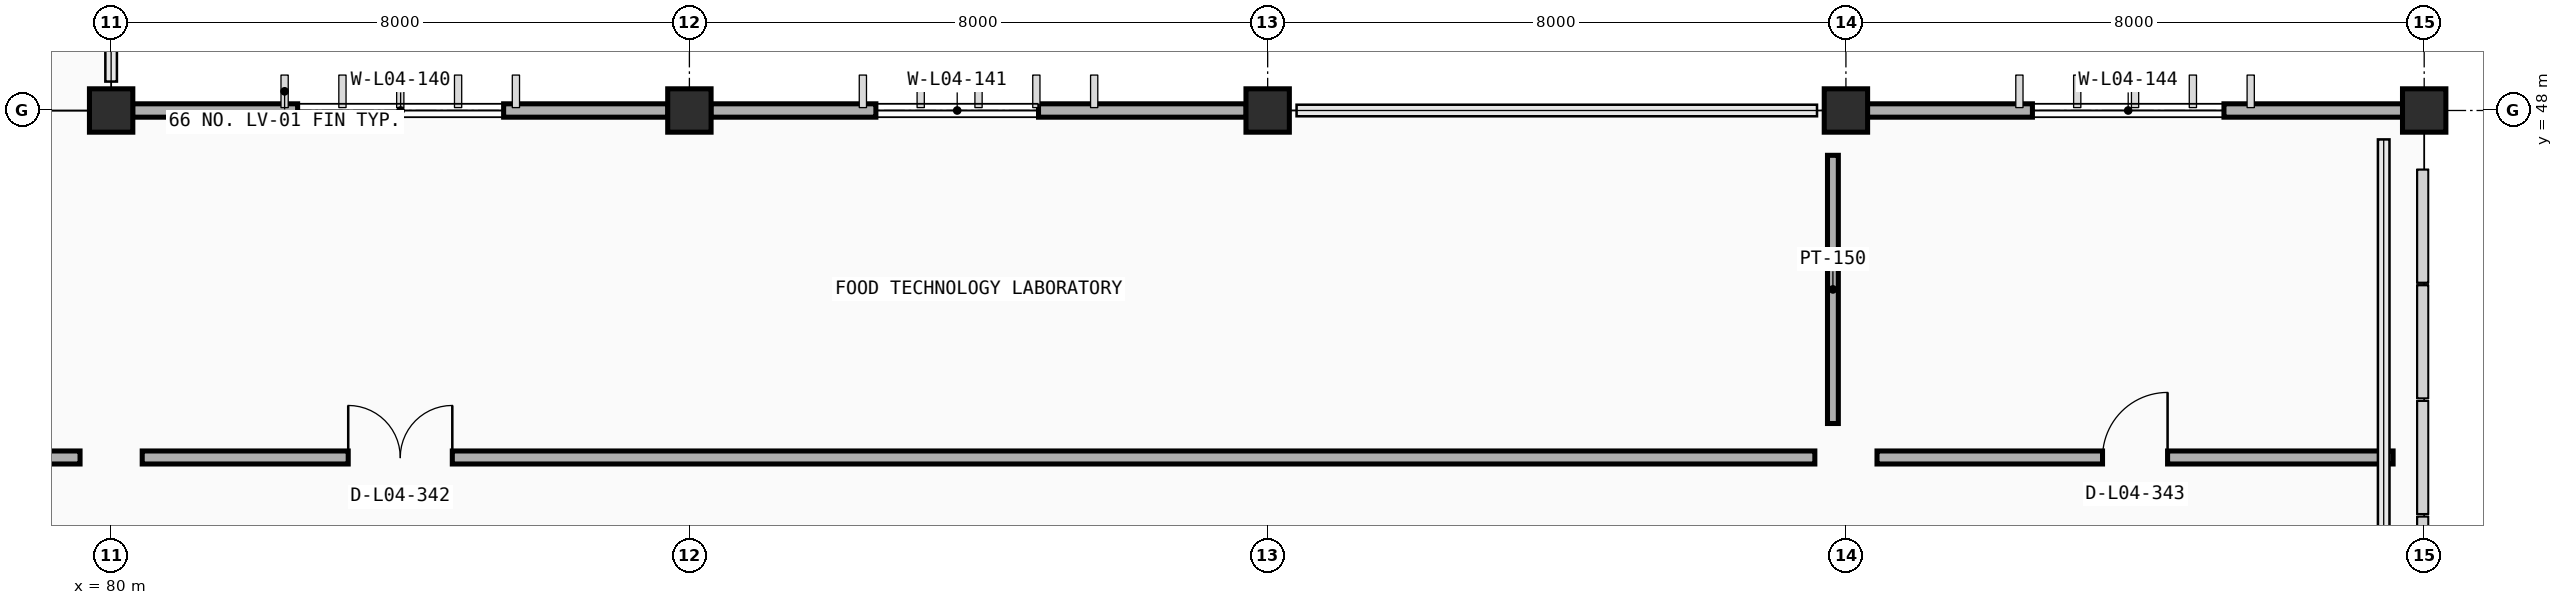
"""IFC4 building model, lengths in metres.
Left out: names, types, materials, properties, quantities, classifications, styles, units other than length and angle.
Written with IfcOpenShell. Run it as: python <this file> out.ifc"""

import sys

from ifc_helpers import new_model, si_unit, direction, frame, frame_2d, origin, origin_2d, place, context, subcontext, project, spatial, rectangle, extrude, element, fill, save


model = new_model("IFC4")
c1 = context("Model", 3, precision=1e-05, world=origin(), true_north=direction((0.0, 1.0)))
c2 = subcontext(c1, "Body", "Model", "MODEL_VIEW")
j1 = project(units=[si_unit("LENGTHUNIT", "METRE"), si_unit("PLANEANGLEUNIT", "RADIAN")], contexts=[c1])
p1 = place(None, origin())
s1 = spatial("IfcSite", under=j1, at=p1, CompositionType="ELEMENT")
p2 = place(p1, origin())
s2 = spatial("IfcBuilding", under=s1, at=p2, CompositionType="ELEMENT")
p3 = place(p2, frame((0.0, 0.0, 13.8)))
s3 = spatial("IfcBuildingStorey", under=s2, at=p3, CompositionType="ELEMENT", Elevation=13.8)
for number, where, z_axis, x_axis in (
    (1, (80.0, 48.0, 0.0), (0.0, 0.0, 1.0), (1.0, 0.0, 0.0)),
    (2, (88.0, 48.0, 0.0), (0.0, 0.0, 1.0), (1.0, 0.0, 0.0)),
    (3, (96.0, 48.0, 0.0), (0.0, 0.0, 1.0), (1.0, 0.0, 0.0)),
    (4, (104.0, 48.0, 0.0), (0.0, 0.0, 1.0), (1.0, 0.0, 0.0)),
    (5, (112.0, 48.0, 0.0), (0.0, 0.0, 1.0), (1.0, 0.0, 0.0)),
):
    element("IfcColumn", number, at=place(p3, frame(where, z_axis=z_axis, x_axis=x_axis)), inside=s3, PredefinedType="COLUMN", context=c2, shape_type="SweptSolid", body=[
        extrude(rectangle(XDim=0.6, YDim=0.6, at=origin_2d()), origin(), (0.0, 0.0, 1.0), 4.2),
    ])
p4 = place(p3, frame((80.297, 48.0, 0.0), z_axis=(0.0, 0.0, 1.0), x_axis=(1.0, 0.0, 0.0)))
e6 = element("IfcWall", 6, at=p4, inside=s3, PredefinedType="STANDARD", context=c2, shape_type="SweptSolid", body=[
    extrude(rectangle(XDim=7.406, YDim=0.185, at=frame_2d((3.703, 0.0))), origin(), (0.0, 0.0, 1.0), 3.325),
])
p5 = place(p4, frame((2.283, 0.0, 0.9)))
e7 = element("IfcOpeningElement", 7, at=p5, cuts=e6, PredefinedType="OPENING", context=c2, shape_type="SweptSolid", body=[
    extrude(rectangle(XDim=2.85, YDim=1.55, at=frame_2d((1.425, 0.775))), frame((0.0, 0.103, 0.0), z_axis=(0.0, -1.0, 0.0), x_axis=(1.0, 0.0, 0.0)), (0.0, 0.0, 1.0), 0.205),
])
p6 = place(p3, frame((88.297, 48.0, 0.0), z_axis=(0.0, 0.0, 1.0), x_axis=(1.0, 0.0, 0.0)))
e8 = element("IfcWall", 8, at=p6, inside=s3, PredefinedType="STANDARD", context=c2, shape_type="SweptSolid", body=[
    extrude(rectangle(XDim=7.406, YDim=0.185, at=frame_2d((3.703, 0.0))), origin(), (0.0, 0.0, 1.0), 3.325),
])
p7 = place(p6, frame((2.283, 0.0, 0.9)))
e9 = element("IfcOpeningElement", 9, at=p7, cuts=e8, PredefinedType="OPENING", context=c2, shape_type="SweptSolid", body=[
    extrude(rectangle(XDim=2.25, YDim=1.55, at=frame_2d((1.125, 0.775))), frame((0.0, 0.103, 0.0), z_axis=(0.0, -1.0, 0.0), x_axis=(1.0, 0.0, 0.0)), (0.0, 0.0, 1.0), 0.205),
])
p8 = place(p3, frame((104.297, 48.0, 0.0), z_axis=(0.0, 0.0, 1.0), x_axis=(1.0, 0.0, 0.0)))
e10 = element("IfcWall", 10, at=p8, inside=s3, PredefinedType="STANDARD", context=c2, shape_type="SweptSolid", body=[
    extrude(rectangle(XDim=7.406, YDim=0.185, at=frame_2d((3.703, 0.0))), origin(), (0.0, 0.0, 1.0), 3.325),
])
p9 = place(p8, frame((2.283, 0.0, 0.9)))
e11 = element("IfcOpeningElement", 11, at=p9, cuts=e10, PredefinedType="OPENING", context=c2, shape_type="SweptSolid", body=[
    extrude(rectangle(XDim=2.65, YDim=1.55, at=frame_2d((1.325, 0.775))), frame((0.0, 0.103, 0.0), z_axis=(0.0, -1.0, 0.0), x_axis=(1.0, 0.0, 0.0)), (0.0, 0.0, 1.0), 0.205),
])
p10 = place(p3, frame((111.76, 47.78, 0.0), z_axis=(0.0, 0.0, 1.0), x_axis=(-1.0, 0.0, 0.0)))
e12 = element("IfcWall", 12, at=p10, inside=s3, PredefinedType="PARAPET", context=c2, shape_type="SweptSolid", body=[
    extrude(rectangle(XDim=0.32, YDim=0.2, at=frame_2d((0.16, 0.0))), origin(), (0.0, 0.0, 1.0), 3.35),
])
p11 = place(p3, frame((56.43, 43.2, 0.0), z_axis=(0.0, 0.0, 1.0), x_axis=(1.0, 0.0, 0.0)))
e13 = element("IfcWall", 13, at=p11, inside=s3, PredefinedType="PARTITIONING", context=c2, shape_type="SweptSolid", body=[
    extrude(rectangle(XDim=23.14, YDim=0.18, at=frame_2d((11.57, 0.0))), origin(), (0.0, 0.0, 1.0), 3.3),
])
p12 = place(p11, frame((2.92, 0.0, 0.0)))
e14 = element("IfcOpeningElement", 14, at=p12, cuts=e13, PredefinedType="OPENING", context=c2, shape_type="SweptSolid", body=[
    extrude(rectangle(XDim=1.3, YDim=2.18, at=frame_2d((0.65, 1.09))), frame((0.0, 0.1, 0.0), z_axis=(0.0, -1.0, 0.0), x_axis=(1.0, 0.0, 0.0)), (0.0, 0.0, 1.0), 0.2),
])
p13 = place(p3, frame((80.43, 43.2, 0.0), z_axis=(0.0, 0.0, 1.0), x_axis=(1.0, 0.0, 0.0)))
e15 = element("IfcWall", 15, at=p13, inside=s3, PredefinedType="PARTITIONING", context=c2, shape_type="SweptSolid", body=[
    extrude(rectangle(XDim=23.14, YDim=0.18, at=frame_2d((11.57, 0.0))), origin(), (0.0, 0.0, 1.0), 3.3),
])
p14 = place(p13, frame((2.85, 0.0, 0.0)))
e16 = element("IfcOpeningElement", 16, at=p14, cuts=e15, PredefinedType="OPENING", context=c2, shape_type="SweptSolid", body=[
    extrude(rectangle(XDim=1.44, YDim=2.2, at=frame_2d((0.72, 1.1))), frame((0.0, 0.1, 0.0), z_axis=(0.0, -1.0, 0.0), x_axis=(1.0, 0.0, 0.0)), (0.0, 0.0, 1.0), 0.2),
])
p15 = place(p3, frame((103.82, 43.67, 0.0), z_axis=(0.0, 0.0, 1.0), x_axis=(0.0, 1.0, 0.0)))
e17 = element("IfcWall", 17, at=p15, inside=s3, PredefinedType="PARTITIONING", context=c2, shape_type="SweptSolid", body=[
    extrude(rectangle(XDim=3.71, YDim=0.15, at=frame_2d((1.855, 0.0))), origin(), (0.0, 0.0, 1.0), 3.225),
])
p16 = place(p3, frame((104.43, 43.2, 0.0), z_axis=(0.0, 0.0, 1.0), x_axis=(1.0, 0.0, 0.0)))
e18 = element("IfcWall", 18, at=p16, inside=s3, PredefinedType="PARTITIONING", context=c2, shape_type="SweptSolid", body=[
    extrude(rectangle(XDim=7.14, YDim=0.18, at=frame_2d((3.57, 0.0))), origin(), (0.0, 0.0, 1.0), 3.3),
])
p17 = place(p16, frame((3.12, 0.0, 0.0)))
e19 = element("IfcOpeningElement", 19, at=p17, cuts=e18, PredefinedType="OPENING", context=c2, shape_type="SweptSolid", body=[
    extrude(rectangle(XDim=0.9, YDim=2.1, at=frame_2d((0.45, 1.05))), frame((0.0, 0.1, 0.0), z_axis=(0.0, -1.0, 0.0), x_axis=(1.0, 0.0, 0.0)), (0.0, 0.0, 1.0), 0.2),
])
p18 = place(p5, origin())
e20 = element("IfcWindow", 20, at=p18, inside=s3, PartitioningType="DOUBLE_PANEL_VERTICAL", PredefinedType="WINDOW", context=c2, shape_type="SweptSolid", body=[
    extrude(rectangle(XDim=2.85, YDim=1.55, at=frame_2d((1.425, 0.775))), frame((0.0, 0.03, 0.0), z_axis=(0.0, -1.0, 0.0), x_axis=(1.0, 0.0, 0.0)), (0.0, 0.0, 1.0), 0.06),
])
fill(e7, e20)
p19 = place(p7, origin())
e21 = element("IfcWindow", 21, at=p19, inside=s3, PartitioningType="DOUBLE_PANEL_VERTICAL", PredefinedType="WINDOW", context=c2, shape_type="SweptSolid", body=[
    extrude(rectangle(XDim=2.25, YDim=1.55, at=frame_2d((1.125, 0.775))), frame((0.0, 0.03, 0.0), z_axis=(0.0, -1.0, 0.0), x_axis=(1.0, 0.0, 0.0)), (0.0, 0.0, 1.0), 0.06),
])
fill(e9, e21)
p20 = place(p9, origin())
e22 = element("IfcWindow", 22, at=p20, inside=s3, PartitioningType="DOUBLE_PANEL_VERTICAL", PredefinedType="WINDOW", context=c2, shape_type="SweptSolid", body=[
    extrude(rectangle(XDim=2.65, YDim=1.55, at=frame_2d((1.325, 0.775))), frame((0.0, 0.03, 0.0), z_axis=(0.0, -1.0, 0.0), x_axis=(1.0, 0.0, 0.0)), (0.0, 0.0, 1.0), 0.06),
])
fill(e11, e22)
p21 = place(p14, origin())
e23 = element("IfcDoor", 23, at=p21, inside=s3, OperationType="DOUBLE_DOOR_SINGLE_SWING", PredefinedType="DOOR", context=c2, shape_type="SweptSolid", body=[
    extrude(rectangle(XDim=1.44, YDim=2.2, at=frame_2d((0.72, 1.1))), frame((0.0, 0.025, 0.0), z_axis=(0.0, -1.0, 0.0), x_axis=(1.0, 0.0, 0.0)), (0.0, 0.0, 1.0), 0.05),
])
fill(e16, e23)
p22 = place(p17, origin())
e24 = element("IfcDoor", 24, at=p22, inside=s3, OperationType="SINGLE_SWING_RIGHT", PredefinedType="DOOR", context=c2, shape_type="SweptSolid", body=[
    extrude(rectangle(XDim=0.9, YDim=2.1, at=frame_2d((0.45, 1.05))), frame((0.0, 0.025, 0.0), z_axis=(0.0, -1.0, 0.0), x_axis=(1.0, 0.0, 0.0)), (0.0, 0.0, 1.0), 0.05),
])
fill(e19, e24)
save(model, sys.argv[1])
